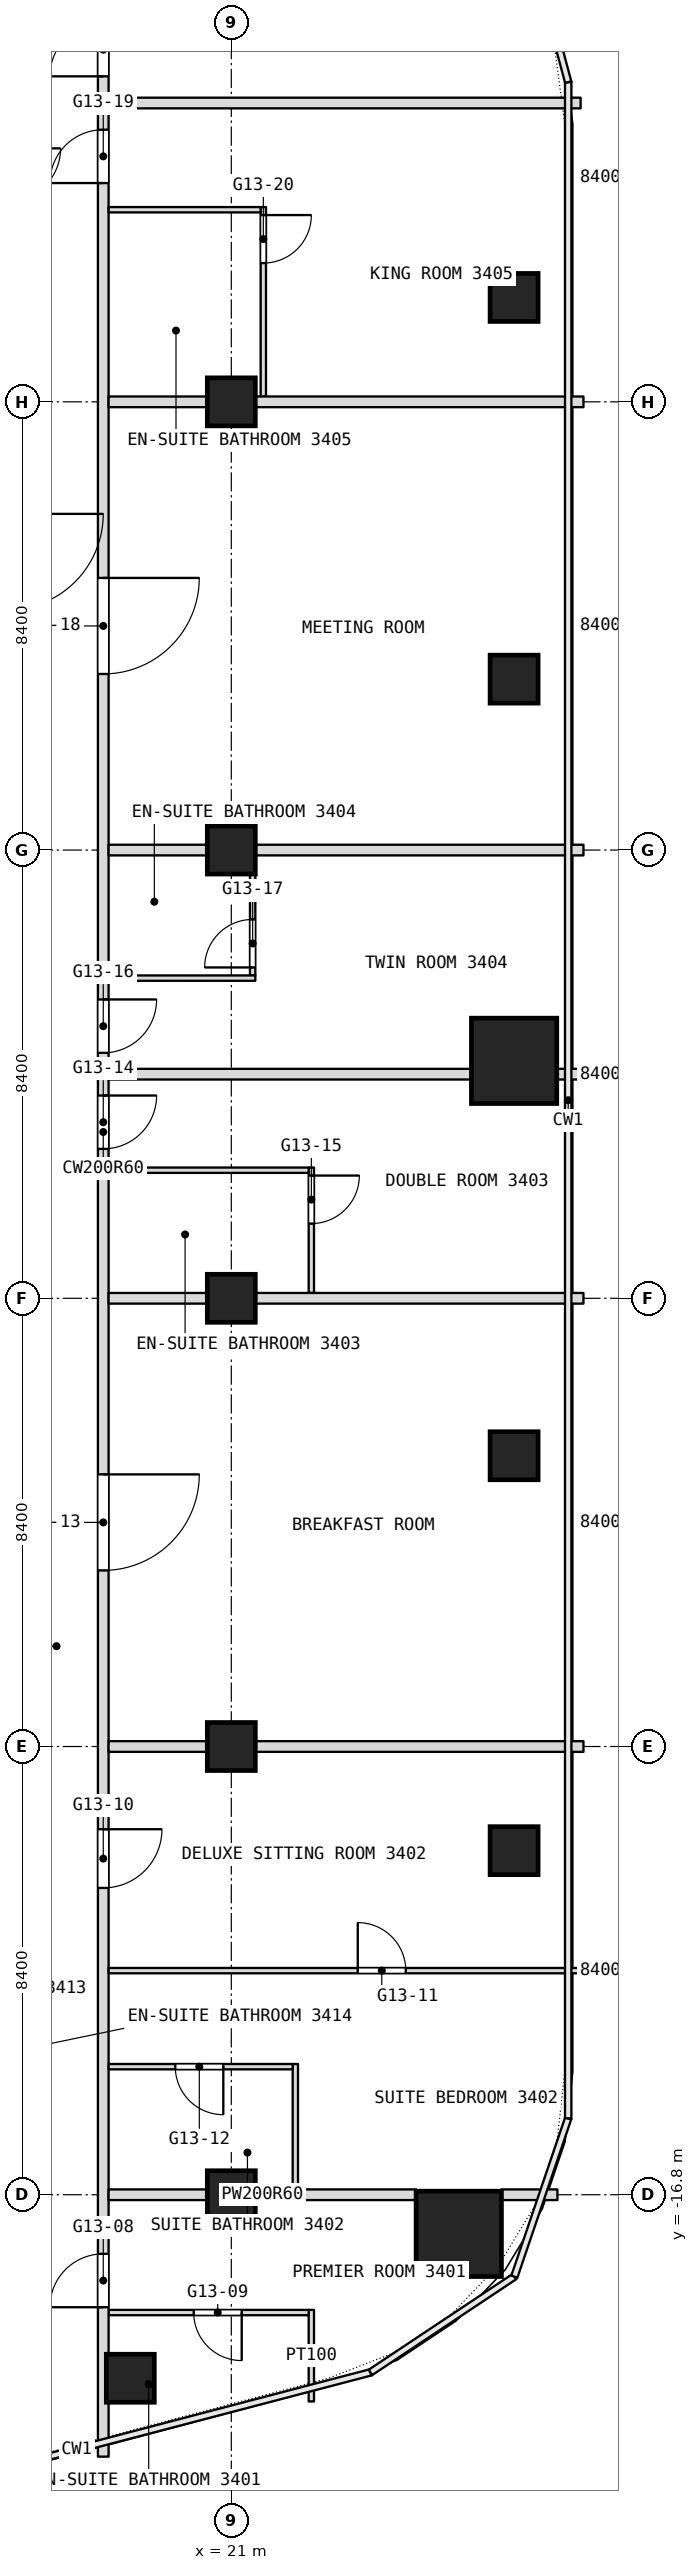
"""IFC4 building model, lengths in metres.
Left out: names, types, materials, properties, quantities, classifications, styles, units other than length and angle.
Written with IfcOpenShell. Run it as: python <this file> out.ifc"""

import sys

from ifc_helpers import new_model, si_unit, direction, frame, frame_2d, origin, origin_2d, place, context, subcontext, project, spatial, rectangle, extrude, element, fill, save


model = new_model("IFC4")
c1 = context("Model", 3, precision=1e-05, world=origin(), true_north=direction((0.0, 1.0)))
c2 = subcontext(c1, "Body", "Model", "MODEL_VIEW")
j1 = project(units=[si_unit("LENGTHUNIT", "METRE"), si_unit("PLANEANGLEUNIT", "RADIAN")], contexts=[c1])
p1 = place(None, origin())
s1 = spatial("IfcSite", under=j1, at=p1, CompositionType="ELEMENT")
p2 = place(p1, origin())
s2 = spatial("IfcBuilding", under=s1, at=p2, CompositionType="ELEMENT")
p3 = place(p2, frame((0.0, 0.0, 148.1)))
s3 = spatial("IfcBuildingStorey", under=s2, at=p3, CompositionType="ELEMENT", Elevation=148.1)
for number, where, z_axis, x_axis in (
    (1, (25.263, -17.533, 0.0), (0.0, 0.0, 1.0), (1.0, 0.0, 0.0)),
    (2, (26.3, 4.45, 0.0), (0.0, 0.0, 1.0), (1.0, 0.0, 0.0)),
):
    element("IfcColumn", number, at=place(p3, frame(where, z_axis=z_axis, x_axis=x_axis)), inside=s3, PredefinedType="COLUMN", context=c2, shape_type="SweptSolid", body=[
        extrude(rectangle(XDim=1.6, YDim=1.6, at=origin_2d()), origin(), (0.0, 0.0, 1.0), 3.6),
    ])
for number, where, z_axis, x_axis in (
    (3, (21.0, -16.8, 0.0), (0.0, 0.0, 1.0), (1.0, 0.0, 0.0)),
    (4, (21.0, -8.4, 0.0), (0.0, 0.0, 1.0), (1.0, 0.0, 0.0)),
    (5, (21.0, 0.0, 0.0), (0.0, 0.0, 1.0), (1.0, 0.0, 0.0)),
    (6, (21.0, 8.4, 0.0), (0.0, 0.0, 1.0), (1.0, 0.0, 0.0)),
    (7, (21.0, 16.8, 0.0), (0.0, 0.0, 1.0), (1.0, 0.0, 0.0)),
    (8, (26.3, 18.756, 0.0), (0.0, 0.0, 1.0), (1.0, 0.0, 0.0)),
    (9, (26.3, 11.603, 0.0), (0.0, 0.0, 1.0), (1.0, 0.0, 0.0)),
    (10, (26.3, -2.951, 0.0), (0.0, 0.0, 1.0), (1.0, 0.0, 0.0)),
    (11, (26.3, -10.352, 0.0), (0.0, 0.0, 1.0), (1.0, 0.0, 0.0)),
    (12, (19.107, -20.239, 0.0), (0.0, 0.0, 1.0), (1.0, 0.0, 0.0)),
):
    element("IfcColumn", number, at=place(p3, frame(where, z_axis=z_axis, x_axis=x_axis)), inside=s3, PredefinedType="COLUMN", context=c2, shape_type="SweptSolid", body=[
        extrude(rectangle(XDim=0.9, YDim=0.9, at=origin_2d()), origin(), (0.0, 0.0, 1.0), 3.6),
    ])
p4 = place(p3, frame((22.5, -20.674, 0.0), z_axis=(0.0, 0.0, 1.0), x_axis=(0.0, 1.0, 0.0)))
e13 = element("IfcWall", 13, at=p4, inside=s3, PredefinedType="PARTITIONING", context=c2, shape_type="SweptSolid", body=[
    extrude(rectangle(XDim=1.716, YDim=0.1, at=frame_2d((0.858, 0.0))), origin(), (0.0, 0.0, 1.0), 3.34),
])
p5 = place(p3, frame((22.5, 0.1, 0.0), z_axis=(0.0, 0.0, 1.0), x_axis=(0.0, 1.0, 0.0)))
e14 = element("IfcWall", 14, at=p5, inside=s3, PredefinedType="PARTITIONING", context=c2, shape_type="SweptSolid", body=[
    extrude(rectangle(XDim=2.35, YDim=0.1, at=frame_2d((1.175, 0.0))), origin(), (0.0, 0.0, 1.0), 3.34),
])
p6 = place(p5, frame((1.3, 0.0, 0.0)))
e15 = element("IfcOpeningElement", 15, at=p6, cuts=e14, PredefinedType="OPENING", context=c2, shape_type="SweptSolid", body=[
    extrude(rectangle(XDim=0.9, YDim=2.1, at=frame_2d((0.45, 1.05))), frame((0.0, 0.05, 0.0), z_axis=(0.0, -1.0, 0.0), x_axis=(1.0, 0.0, 0.0)), (0.0, 0.0, 1.0), 0.1),
])
p7 = place(p3, frame((22.2, -16.7, 0.0), z_axis=(0.0, 0.0, 1.0), x_axis=(0.0, 1.0, 0.0)))
e16 = element("IfcWall", 16, at=p7, inside=s3, PredefinedType="PARTITIONING", context=c2, shape_type="SweptSolid", body=[
    extrude(rectangle(XDim=2.35, YDim=0.1, at=frame_2d((1.175, 0.0))), origin(), (0.0, 0.0, 1.0), 3.34),
])
p8 = place(p3, frame((21.6, 16.9, 0.0), z_axis=(0.0, 0.0, 1.0), x_axis=(0.0, 1.0, 0.0)))
e17 = element("IfcWall", 17, at=p8, inside=s3, PredefinedType="PARTITIONING", context=c2, shape_type="SweptSolid", body=[
    extrude(rectangle(XDim=3.55, YDim=0.1, at=frame_2d((1.775, 0.0))), origin(), (0.0, 0.0, 1.0), 3.34),
])
p9 = place(p8, frame((2.5, 0.0, 0.0)))
e18 = element("IfcOpeningElement", 18, at=p9, cuts=e17, PredefinedType="OPENING", context=c2, shape_type="SweptSolid", body=[
    extrude(rectangle(XDim=0.9, YDim=2.1, at=frame_2d((0.45, 1.05))), frame((0.0, 0.05, 0.0), z_axis=(0.0, -1.0, 0.0), x_axis=(1.0, 0.0, 0.0)), (0.0, 0.0, 1.0), 0.1),
])
p10 = place(p3, frame((21.4, 6.05, 0.0), z_axis=(0.0, 0.0, 1.0), x_axis=(0.0, 1.0, 0.0)))
e19 = element("IfcWall", 19, at=p10, inside=s3, PredefinedType="PARTITIONING", context=c2, shape_type="SweptSolid", body=[
    extrude(rectangle(XDim=2.45, YDim=0.1, at=frame_2d((1.225, 0.0))), origin(), (0.0, 0.0, 1.0), 3.34),
])
p11 = place(p10, frame((0.15, 0.0, 0.0)))
e20 = element("IfcOpeningElement", 20, at=p11, cuts=e19, PredefinedType="OPENING", context=c2, shape_type="SweptSolid", body=[
    extrude(rectangle(XDim=0.9, YDim=2.1, at=frame_2d((0.45, 1.05))), frame((0.0, 0.05, 0.0), z_axis=(0.0, -1.0, 0.0), x_axis=(1.0, 0.0, 0.0)), (0.0, 0.0, 1.0), 0.1),
])
p12 = place(p3, frame((18.7, -19.008, 0.0), z_axis=(0.0, 0.0, 1.0), x_axis=(1.0, 0.0, 0.0)))
e21 = element("IfcWall", 21, at=p12, inside=s3, PredefinedType="PARTITIONING", context=c2, shape_type="SweptSolid", body=[
    extrude(rectangle(XDim=3.75, YDim=0.1, at=frame_2d((1.875, 0.0))), origin(), (0.0, 0.0, 1.0), 3.34),
])
p13 = place(p12, frame((1.595, 0.0, 0.0)))
e22 = element("IfcOpeningElement", 22, at=p13, cuts=e21, PredefinedType="OPENING", context=c2, shape_type="SweptSolid", body=[
    extrude(rectangle(XDim=0.9, YDim=2.1, at=frame_2d((0.45, 1.05))), frame((0.0, 0.05, 0.0), z_axis=(0.0, -1.0, 0.0), x_axis=(1.0, 0.0, 0.0)), (0.0, 0.0, 1.0), 0.1),
])
p14 = place(p3, frame((18.6, -21.708, 0.0), z_axis=(0.0, 0.0, 1.0), x_axis=(0.0, 1.0, 0.0)))
e23 = element("IfcWall", 23, at=p14, inside=s3, PredefinedType="PARTITIONING", context=c2, shape_type="SweptSolid", body=[
    extrude(rectangle(XDim=49.648, YDim=0.2, at=frame_2d((24.824, 0.0))), origin(), (0.0, 0.0, 1.0), 3.34),
])
p15 = place(p14, frame((2.8, 0.0, 0.0)))
e24 = element("IfcOpeningElement", 24, at=p15, cuts=e23, PredefinedType="OPENING", context=c2, shape_type="SweptSolid", body=[
    extrude(rectangle(XDim=1.0, YDim=2.1, at=frame_2d((0.5, 1.05))), frame((0.0, 0.1, 0.0), z_axis=(0.0, -1.0, 0.0), x_axis=(1.0, 0.0, 0.0)), (0.0, 0.0, 1.0), 0.2),
])
p16 = place(p14, frame((10.658, 0.0, 0.0)))
e25 = element("IfcOpeningElement", 25, at=p16, cuts=e23, PredefinedType="OPENING", context=c2, shape_type="SweptSolid", body=[
    extrude(rectangle(XDim=1.1, YDim=2.1, at=frame_2d((0.55, 1.05))), frame((0.0, 0.1, 0.0), z_axis=(0.0, -1.0, 0.0), x_axis=(1.0, 0.0, 0.0)), (0.0, 0.0, 1.0), 0.2),
])
p17 = place(p14, frame((16.608, 0.0, 0.0)))
e26 = element("IfcOpeningElement", 26, at=p17, cuts=e23, PredefinedType="OPENING", context=c2, shape_type="SweptSolid", body=[
    extrude(rectangle(XDim=1.8, YDim=2.1, at=frame_2d((0.9, 1.05))), frame((0.0, 0.1, 0.0), z_axis=(0.0, -1.0, 0.0), x_axis=(1.0, 0.0, 0.0)), (0.0, 0.0, 1.0), 0.2),
])
p18 = place(p14, frame((24.508, 0.0, 0.0)))
e27 = element("IfcOpeningElement", 27, at=p18, cuts=e23, PredefinedType="OPENING", context=c2, shape_type="SweptSolid", body=[
    extrude(rectangle(XDim=1.0, YDim=2.1, at=frame_2d((0.5, 1.05))), frame((0.0, 0.1, 0.0), z_axis=(0.0, -1.0, 0.0), x_axis=(1.0, 0.0, 0.0)), (0.0, 0.0, 1.0), 0.2),
])
p19 = place(p14, frame((26.308, 0.0, 0.0)))
e28 = element("IfcOpeningElement", 28, at=p19, cuts=e23, PredefinedType="OPENING", context=c2, shape_type="SweptSolid", body=[
    extrude(rectangle(XDim=1.0, YDim=2.1, at=frame_2d((0.5, 1.05))), frame((0.0, 0.1, 0.0), z_axis=(0.0, -1.0, 0.0), x_axis=(1.0, 0.0, 0.0)), (0.0, 0.0, 1.0), 0.2),
])
p20 = place(p14, frame((33.408, 0.0, 0.0)))
e29 = element("IfcOpeningElement", 29, at=p20, cuts=e23, PredefinedType="OPENING", context=c2, shape_type="SweptSolid", body=[
    extrude(rectangle(XDim=1.8, YDim=2.1, at=frame_2d((0.9, 1.05))), frame((0.0, 0.1, 0.0), z_axis=(0.0, -1.0, 0.0), x_axis=(1.0, 0.0, 0.0)), (0.0, 0.0, 1.0), 0.2),
])
p21 = place(p14, frame((42.608, 0.0, 0.0)))
e30 = element("IfcOpeningElement", 30, at=p21, cuts=e23, PredefinedType="OPENING", context=c2, shape_type="SweptSolid", body=[
    extrude(rectangle(XDim=1.0, YDim=2.1, at=frame_2d((0.5, 1.05))), frame((0.0, 0.1, 0.0), z_axis=(0.0, -1.0, 0.0), x_axis=(1.0, 0.0, 0.0)), (0.0, 0.0, 1.0), 0.2),
])
p22 = place(p14, frame((44.608, 0.0, 0.0)))
e31 = element("IfcOpeningElement", 31, at=p22, cuts=e23, PredefinedType="OPENING", context=c2, shape_type="SweptSolid", body=[
    extrude(rectangle(XDim=1.0, YDim=2.1, at=frame_2d((0.5, 1.05))), frame((0.0, 0.1, 0.0), z_axis=(0.0, -1.0, 0.0), x_axis=(1.0, 0.0, 0.0)), (0.0, 0.0, 1.0), 0.2),
])
p23 = place(p3, frame((18.7, -16.8, 0.0), z_axis=(0.0, 0.0, 1.0), x_axis=(1.0, 0.0, 0.0)))
e32 = element("IfcWall", 32, at=p23, inside=s3, PredefinedType="PARTITIONING", context=c2, shape_type="SweptSolid", body=[
    extrude(rectangle(XDim=5.763, YDim=0.2, at=frame_2d((2.881, 0.0))), origin(), (0.0, 0.0, 1.0), 2.89),
])
p24 = place(p3, frame((26.063, -16.8, 0.0), z_axis=(0.0, 0.0, 1.0), x_axis=(1.0, 0.0, 0.0)))
e33 = element("IfcWall", 33, at=p24, inside=s3, PredefinedType="PARTITIONING", context=c2, shape_type="SweptSolid", body=[
    extrude(rectangle(XDim=1.049, YDim=0.2, at=frame_2d((0.524, 0.0))), origin(), (0.0, 0.0, 1.0), 3.34),
])
p25 = place(p3, frame((18.7, -14.4, 0.0), z_axis=(0.0, 0.0, 1.0), x_axis=(1.0, 0.0, 0.0)))
e34 = element("IfcWall", 34, at=p25, inside=s3, PredefinedType="PARTITIONING", context=c2, shape_type="SweptSolid", body=[
    extrude(rectangle(XDim=3.45, YDim=0.1, at=frame_2d((1.725, 0.0))), origin(), (0.0, 0.0, 1.0), 3.34),
])
p26 = place(p25, frame((1.25, 0.0, 0.0)))
e35 = element("IfcOpeningElement", 35, at=p26, cuts=e34, PredefinedType="OPENING", context=c2, shape_type="SweptSolid", body=[
    extrude(rectangle(XDim=0.9, YDim=2.1, at=frame_2d((0.45, 1.05))), frame((0.0, 0.05, 0.0), z_axis=(0.0, -1.0, 0.0), x_axis=(1.0, 0.0, 0.0)), (0.0, 0.0, 1.0), 0.1),
])
p27 = place(p3, frame((18.7, -12.6, 0.0), z_axis=(0.0, 0.0, 1.0), x_axis=(1.0, 0.0, 0.0)))
e36 = element("IfcWall", 36, at=p27, inside=s3, PredefinedType="PARTITIONING", context=c2, shape_type="SweptSolid", body=[
    extrude(rectangle(XDim=8.9, YDim=0.1, at=frame_2d((4.45, 0.0))), origin(), (0.0, 0.0, 1.0), 3.34),
])
p28 = place(p27, frame((4.67, 0.0, 0.0)))
e37 = element("IfcOpeningElement", 37, at=p28, cuts=e36, PredefinedType="OPENING", context=c2, shape_type="SweptSolid", body=[
    extrude(rectangle(XDim=0.9, YDim=2.1, at=frame_2d((0.45, 1.05))), frame((0.0, 0.05, 0.0), z_axis=(0.0, -1.0, 0.0), x_axis=(1.0, 0.0, 0.0)), (0.0, 0.0, 1.0), 0.1),
])
for number, where, z_axis, x_axis in (
    (38, (18.7, -8.4, 0.0), (0.0, 0.0, 1.0), (1.0, 0.0, 0.0)),
    (39, (18.7, 0.0, 0.0), (0.0, 0.0, 1.0), (1.0, 0.0, 0.0)),
):
    element("IfcWall", number, at=place(p3, frame(where, z_axis=z_axis, x_axis=x_axis)), inside=s3, PredefinedType="PARTITIONING", context=c2, shape_type="SweptSolid", body=[
        extrude(rectangle(XDim=8.9, YDim=0.2, at=frame_2d((4.45, 0.0))), origin(), (0.0, 0.0, 1.0), 2.89),
    ])
p29 = place(p3, frame((18.7, 2.4, 0.0), z_axis=(0.0, 0.0, 1.0), x_axis=(1.0, 0.0, 0.0)))
e40 = element("IfcWall", 40, at=p29, inside=s3, PredefinedType="PARTITIONING", context=c2, shape_type="SweptSolid", body=[
    extrude(rectangle(XDim=3.75, YDim=0.1, at=frame_2d((1.875, 0.0))), origin(), (0.0, 0.0, 1.0), 3.34),
])
p30 = place(p3, frame((18.7, 4.2, 0.0), z_axis=(0.0, 0.0, 1.0), x_axis=(1.0, 0.0, 0.0)))
e41 = element("IfcWall", 41, at=p30, inside=s3, PredefinedType="PARTITIONING", context=c2, shape_type="SweptSolid", body=[
    extrude(rectangle(XDim=6.8, YDim=0.2, at=frame_2d((3.4, 0.0))), origin(), (0.0, 0.0, 1.0), 3.34),
])
p31 = place(p3, frame((27.1, 4.2, 0.0), z_axis=(0.0, 0.0, 1.0), x_axis=(1.0, 0.0, 0.0)))
e42 = element("IfcWall", 42, at=p31, inside=s3, PredefinedType="PARTITIONING", context=c2, shape_type="SweptSolid", body=[
    extrude(rectangle(XDim=0.5, YDim=0.2, at=frame_2d((0.25, 0.0))), origin(), (0.0, 0.0, 1.0), 3.34),
])
p32 = place(p3, frame((18.7, 6.0, 0.0), z_axis=(0.0, 0.0, 1.0), x_axis=(1.0, 0.0, 0.0)))
e43 = element("IfcWall", 43, at=p32, inside=s3, PredefinedType="PARTITIONING", context=c2, shape_type="SweptSolid", body=[
    extrude(rectangle(XDim=2.75, YDim=0.1, at=frame_2d((1.375, 0.0))), origin(), (0.0, 0.0, 1.0), 3.34),
])
for number, where, z_axis, x_axis in (
    (44, (18.7, 8.4, 0.0), (0.0, 0.0, 1.0), (1.0, 0.0, 0.0)),
    (45, (18.7, 16.8, 0.0), (0.0, 0.0, 1.0), (1.0, 0.0, 0.0)),
):
    element("IfcWall", number, at=place(p3, frame(where, z_axis=z_axis, x_axis=x_axis)), inside=s3, PredefinedType="PARTITIONING", context=c2, shape_type="SweptSolid", body=[
        extrude(rectangle(XDim=8.9, YDim=0.2, at=frame_2d((4.45, 0.0))), origin(), (0.0, 0.0, 1.0), 2.89),
    ])
p33 = place(p3, frame((18.7, 20.4, 0.0), z_axis=(0.0, 0.0, 1.0), x_axis=(1.0, 0.0, 0.0)))
e46 = element("IfcWall", 46, at=p33, inside=s3, PredefinedType="PARTITIONING", context=c2, shape_type="SweptSolid", body=[
    extrude(rectangle(XDim=2.85, YDim=0.1, at=frame_2d((1.425, 0.0))), origin(), (0.0, 0.0, 1.0), 3.34),
])
p34 = place(p3, frame((18.7, 22.4, 0.0), z_axis=(0.0, 0.0, 1.0), x_axis=(1.0, 0.0, 0.0)))
e47 = element("IfcWall", 47, at=p34, inside=s3, PredefinedType="PARTITIONING", context=c2, shape_type="SweptSolid", body=[
    extrude(rectangle(XDim=8.847, YDim=0.2, at=frame_2d((4.424, 0.0))), origin(), (0.0, 0.0, 1.0), 3.34),
])
p35 = place(p6, origin())
e48 = element("IfcDoor", 48, at=p35, inside=s3, OperationType="SINGLE_SWING_RIGHT", PredefinedType="DOOR", context=c2, shape_type="SweptSolid", body=[
    extrude(rectangle(XDim=0.9, YDim=2.1, at=frame_2d((0.45, 1.05))), frame((0.0, 0.025, 0.0), z_axis=(0.0, -1.0, 0.0), x_axis=(1.0, 0.0, 0.0)), (0.0, 0.0, 1.0), 0.05),
])
fill(e15, e48)
p36 = place(p9, origin())
e49 = element("IfcDoor", 49, at=p36, inside=s3, OperationType="SINGLE_SWING_RIGHT", PredefinedType="DOOR", context=c2, shape_type="SweptSolid", body=[
    extrude(rectangle(XDim=0.9, YDim=2.1, at=frame_2d((0.45, 1.05))), frame((0.0, 0.025, 0.0), z_axis=(0.0, -1.0, 0.0), x_axis=(1.0, 0.0, 0.0)), (0.0, 0.0, 1.0), 0.05),
])
fill(e18, e49)
p37 = place(p11, origin())
e50 = element("IfcDoor", 50, at=p37, inside=s3, OperationType="SINGLE_SWING_LEFT", PredefinedType="DOOR", context=c2, shape_type="SweptSolid", body=[
    extrude(rectangle(XDim=0.9, YDim=2.1, at=frame_2d((0.45, 1.05))), frame((0.0, 0.025, 0.0), z_axis=(0.0, -1.0, 0.0), x_axis=(1.0, 0.0, 0.0)), (0.0, 0.0, 1.0), 0.05),
])
fill(e20, e50)
p38 = place(p13, origin())
e51 = element("IfcDoor", 51, at=p38, inside=s3, OperationType="SINGLE_SWING_RIGHT", PredefinedType="DOOR", context=c2, shape_type="SweptSolid", body=[
    extrude(rectangle(XDim=0.9, YDim=2.1, at=frame_2d((0.45, 1.05))), frame((0.0, 0.025, 0.0), z_axis=(0.0, -1.0, 0.0), x_axis=(1.0, 0.0, 0.0)), (0.0, 0.0, 1.0), 0.05),
])
fill(e22, e51)
p39 = place(p15, origin())
e52 = element("IfcDoor", 52, at=p39, inside=s3, OperationType="SINGLE_SWING_RIGHT", PredefinedType="DOOR", context=c2, shape_type="SweptSolid", body=[
    extrude(rectangle(XDim=1.0, YDim=2.1, at=frame_2d((0.5, 1.05))), frame((0.0, 0.025, 0.0), z_axis=(0.0, -1.0, 0.0), x_axis=(1.0, 0.0, 0.0)), (0.0, 0.0, 1.0), 0.05),
])
fill(e24, e52)
p40 = place(p16, origin())
e53 = element("IfcDoor", 53, at=p40, inside=s3, OperationType="SINGLE_SWING_RIGHT", PredefinedType="DOOR", context=c2, shape_type="SweptSolid", body=[
    extrude(rectangle(XDim=1.1, YDim=2.1, at=frame_2d((0.55, 1.05))), frame((0.0, 0.025, 0.0), z_axis=(0.0, -1.0, 0.0), x_axis=(1.0, 0.0, 0.0)), (0.0, 0.0, 1.0), 0.05),
])
fill(e25, e53)
p41 = place(p17, origin())
e54 = element("IfcDoor", 54, at=p41, inside=s3, OperationType="DOUBLE_DOOR_SINGLE_SWING", PredefinedType="DOOR", context=c2, shape_type="SweptSolid", body=[
    extrude(rectangle(XDim=1.8, YDim=2.1, at=frame_2d((0.9, 1.05))), frame((0.0, 0.025, 0.0), z_axis=(0.0, -1.0, 0.0), x_axis=(1.0, 0.0, 0.0)), (0.0, 0.0, 1.0), 0.05),
])
fill(e26, e54)
p42 = place(p18, origin())
e55 = element("IfcDoor", 55, at=p42, inside=s3, OperationType="SINGLE_SWING_RIGHT", PredefinedType="DOOR", context=c2, shape_type="SweptSolid", body=[
    extrude(rectangle(XDim=1.0, YDim=2.1, at=frame_2d((0.5, 1.05))), frame((0.0, 0.025, 0.0), z_axis=(0.0, -1.0, 0.0), x_axis=(1.0, 0.0, 0.0)), (0.0, 0.0, 1.0), 0.05),
])
fill(e27, e55)
p43 = place(p19, origin())
e56 = element("IfcDoor", 56, at=p43, inside=s3, OperationType="SINGLE_SWING_RIGHT", PredefinedType="DOOR", context=c2, shape_type="SweptSolid", body=[
    extrude(rectangle(XDim=1.0, YDim=2.1, at=frame_2d((0.5, 1.05))), frame((0.0, 0.025, 0.0), z_axis=(0.0, -1.0, 0.0), x_axis=(1.0, 0.0, 0.0)), (0.0, 0.0, 1.0), 0.05),
])
fill(e28, e56)
p44 = place(p20, origin())
e57 = element("IfcDoor", 57, at=p44, inside=s3, OperationType="DOUBLE_DOOR_SINGLE_SWING", PredefinedType="DOOR", context=c2, shape_type="SweptSolid", body=[
    extrude(rectangle(XDim=1.8, YDim=2.1, at=frame_2d((0.9, 1.05))), frame((0.0, 0.025, 0.0), z_axis=(0.0, -1.0, 0.0), x_axis=(1.0, 0.0, 0.0)), (0.0, 0.0, 1.0), 0.05),
])
fill(e29, e57)
p45 = place(p21, origin())
e58 = element("IfcDoor", 58, at=p45, inside=s3, OperationType="SINGLE_SWING_LEFT", PredefinedType="DOOR", context=c2, shape_type="SweptSolid", body=[
    extrude(rectangle(XDim=1.0, YDim=2.1, at=frame_2d((0.5, 1.05))), frame((0.0, 0.025, 0.0), z_axis=(0.0, -1.0, 0.0), x_axis=(1.0, 0.0, 0.0)), (0.0, 0.0, 1.0), 0.05),
])
fill(e30, e58)
p46 = place(p22, origin())
e59 = element("IfcDoor", 59, at=p46, inside=s3, OperationType="SINGLE_SWING_LEFT", PredefinedType="DOOR", context=c2, shape_type="SweptSolid", body=[
    extrude(rectangle(XDim=1.0, YDim=2.1, at=frame_2d((0.5, 1.05))), frame((0.0, 0.025, 0.0), z_axis=(0.0, -1.0, 0.0), x_axis=(1.0, 0.0, 0.0)), (0.0, 0.0, 1.0), 0.05),
])
fill(e31, e59)
p47 = place(p26, origin())
e60 = element("IfcDoor", 60, at=p47, inside=s3, OperationType="SINGLE_SWING_RIGHT", PredefinedType="DOOR", context=c2, shape_type="SweptSolid", body=[
    extrude(rectangle(XDim=0.9, YDim=2.1, at=frame_2d((0.45, 1.05))), frame((0.0, 0.025, 0.0), z_axis=(0.0, -1.0, 0.0), x_axis=(1.0, 0.0, 0.0)), (0.0, 0.0, 1.0), 0.05),
])
fill(e35, e60)
p48 = place(p28, origin())
e61 = element("IfcDoor", 61, at=p48, inside=s3, OperationType="SINGLE_SWING_RIGHT", PredefinedType="DOOR", context=c2, shape_type="SweptSolid", body=[
    extrude(rectangle(XDim=0.9, YDim=2.1, at=frame_2d((0.45, 1.05))), frame((0.0, 0.025, 0.0), z_axis=(0.0, -1.0, 0.0), x_axis=(1.0, 0.0, 0.0)), (0.0, 0.0, 1.0), 0.05),
])
fill(e37, e61)
save(model, sys.argv[1])
